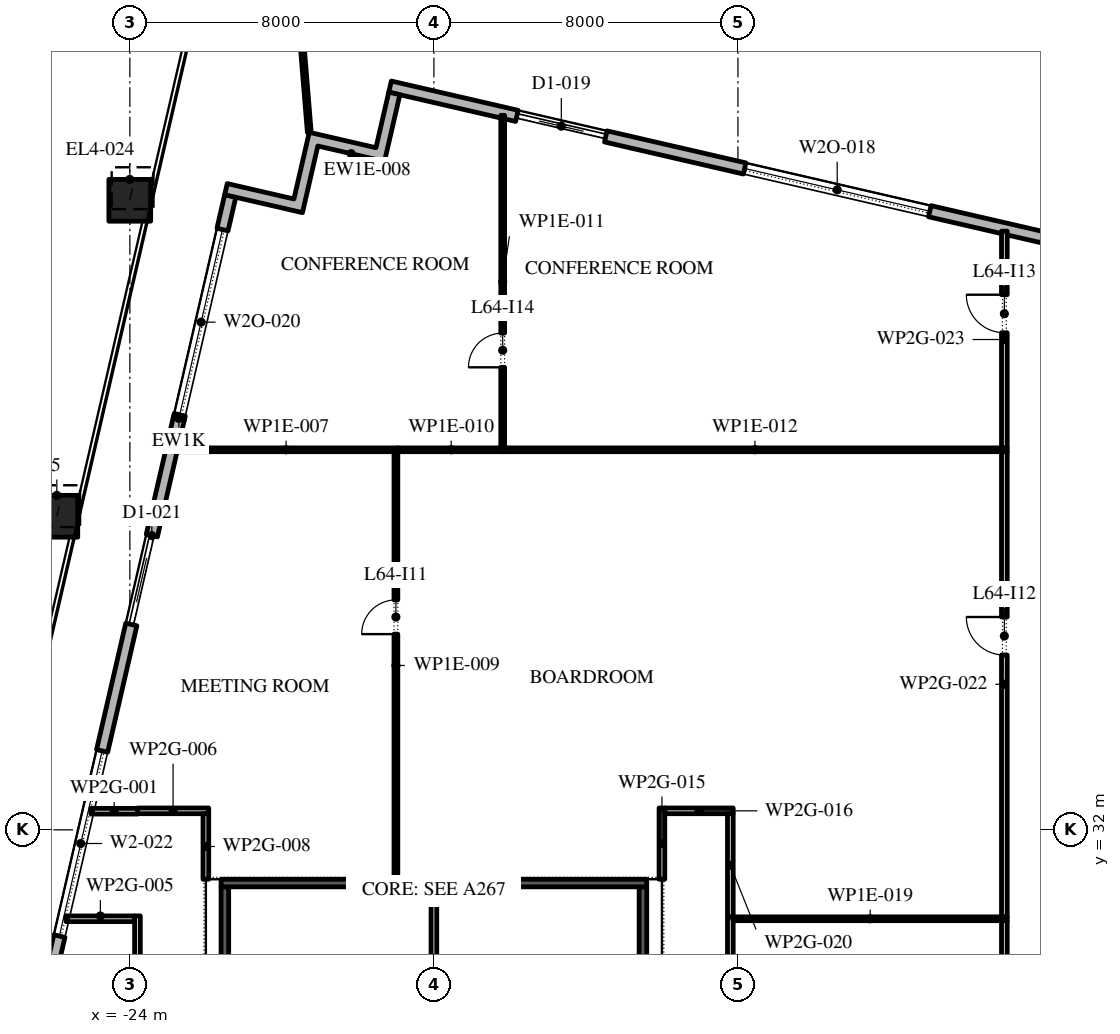
"""IFC4 building model, lengths in metres.
Left out: names, types, materials, properties, quantities, classifications, styles, units other than length and angle.
Written with IfcOpenShell. Run it as: python <this file> out.ifc"""

import sys

from ifc_helpers import new_model, si_unit, direction, frame, frame_2d, origin, origin_2d, place, context, subcontext, project, spatial, polyline, rectangle, outline, extrude, element, fill, save


model = new_model("IFC4")
c1 = context("Model", 3, precision=1e-05, world=origin(), true_north=direction((0.0, 1.0)))
c2 = subcontext(c1, "Body", "Model", "MODEL_VIEW")
j1 = project(units=[si_unit("LENGTHUNIT", "METRE"), si_unit("PLANEANGLEUNIT", "RADIAN")], contexts=[c1])
p1 = place(None, origin())
s1 = spatial("IfcSite", under=j1, at=p1, CompositionType="ELEMENT")
p2 = place(p1, origin())
s2 = spatial("IfcBuilding", under=s1, at=p2, CompositionType="ELEMENT")
p3 = place(p2, frame((0.0, 0.0, 293.4)))
s3 = spatial("IfcBuildingStorey", under=s2, at=p3, CompositionType="ELEMENT", Elevation=293.4)
p4 = place(p3, frame((-24.002, 48.565, 0.0), z_axis=(0.017501014434, 0.075683194872, 0.996978318976), x_axis=(-0.974290512438, 0.225295355862, 0.0)))
e1 = element("IfcColumn", 1, at=p4, inside=s3, PredefinedType="COLUMN", context=c2, shape_type="SweptSolid", body=[
    extrude(rectangle(XDim=1.1, YDim=1.1, at=origin_2d()), origin(), (0.0, 0.0, 1.0), 4.213),
])
p5 = place(p3, frame((-25.921, 40.251, 0.0), z_axis=(0.014558999143, 0.063108330945, 0.997900483069), x_axis=(-0.97440628778, 0.224794097641, 0.0)))
e2 = element("IfcColumn", 2, at=p5, inside=s3, PredefinedType="COLUMN", context=c2, shape_type="SweptSolid", body=[
    extrude(rectangle(XDim=1.1, YDim=1.1, at=origin_2d()), origin(), (0.0, 0.0, 1.0), 4.209),
])
p6 = place(p3, frame((29.616, 40.758, 0.0), z_axis=(0.0, 0.0, 1.0), x_axis=(-0.974370532314, 0.224949029246, 0.0)))
e3 = element("IfcWall", 3, at=p6, inside=s3, PredefinedType="STANDARD", context=c2, shape_type="SweptSolid", body=[
    extrude(rectangle(XDim=48.0, YDim=0.3, at=frame_2d((24.0, 0.0))), origin(), (0.0, 0.0, 1.0), 3.75),
])
p7 = place(p6, frame((1.375, 0.0, 0.45)))
e4 = element("IfcOpeningElement", 4, at=p7, cuts=e3, PredefinedType="OPENING", context=c2, shape_type="SweptSolid", body=[
    extrude(rectangle(XDim=5.0, YDim=2.2, at=frame_2d((2.5, 1.1))), frame((0.0, 0.16, 0.0), z_axis=(0.0, -1.0, 0.0), x_axis=(1.0, 0.0, 0.0)), (0.0, 0.0, 1.0), 0.32),
])
p8 = place(p6, frame((10.575, 0.0, 0.0)))
e5 = element("IfcOpeningElement", 5, at=p8, cuts=e3, PredefinedType="OPENING", context=c2, shape_type="SweptSolid", body=[
    extrude(rectangle(XDim=2.4, YDim=2.65, at=frame_2d((1.2, 1.325))), frame((0.0, 0.16, 0.0), z_axis=(0.0, -1.0, 0.0), x_axis=(1.0, 0.0, 0.0)), (0.0, 0.0, 1.0), 0.32),
])
p9 = place(p6, frame((17.325, 0.0, 0.45)))
e6 = element("IfcOpeningElement", 6, at=p9, cuts=e3, PredefinedType="OPENING", context=c2, shape_type="SweptSolid", body=[
    extrude(rectangle(XDim=5.0, YDim=2.2, at=frame_2d((2.5, 1.1))), frame((0.0, 0.16, 0.0), z_axis=(0.0, -1.0, 0.0), x_axis=(1.0, 0.0, 0.0)), (0.0, 0.0, 1.0), 0.32),
])
p10 = place(p6, frame((25.375, 0.0, 0.45)))
e7 = element("IfcOpeningElement", 7, at=p10, cuts=e3, PredefinedType="OPENING", context=c2, shape_type="SweptSolid", body=[
    extrude(rectangle(XDim=5.0, YDim=2.2, at=frame_2d((2.5, 1.1))), frame((0.0, 0.16, 0.0), z_axis=(0.0, -1.0, 0.0), x_axis=(1.0, 0.0, 0.0)), (0.0, 0.0, 1.0), 0.32),
])
p11 = place(p6, frame((33.425, 0.0, 0.45)))
e8 = element("IfcOpeningElement", 8, at=p11, cuts=e3, PredefinedType="OPENING", context=c2, shape_type="SweptSolid", body=[
    extrude(rectangle(XDim=5.0, YDim=2.2, at=frame_2d((2.5, 1.1))), frame((0.0, 0.16, 0.0), z_axis=(0.0, -1.0, 0.0), x_axis=(1.0, 0.0, 0.0)), (0.0, 0.0, 1.0), 0.32),
])
p12 = place(p6, frame((42.175, 0.0, 0.0)))
e9 = element("IfcOpeningElement", 9, at=p12, cuts=e3, PredefinedType="OPENING", context=c2, shape_type="SweptSolid", body=[
    extrude(rectangle(XDim=2.4, YDim=3.5, at=frame_2d((1.2, 1.75))), frame((0.0, 0.16, 0.0), z_axis=(0.0, -1.0, 0.0), x_axis=(1.0, 0.0, 0.0)), (0.0, 0.0, 1.0), 0.32),
])
p13 = place(p3, frame((-21.359, 48.678, 0.0), z_axis=(0.0, 0.0, 1.0), x_axis=(-0.224957459086, -0.974368586112, 0.0)))
e10 = element("IfcWall", 10, at=p13, inside=s3, PredefinedType="STANDARD", context=c2, shape_type="SweptSolid", body=[
    extrude(rectangle(XDim=6.007, YDim=0.3, at=frame_2d((3.003, 0.0))), origin(), (0.0, 0.0, 1.0), 2.77),
])
p14 = place(p13, frame((0.907, 0.0, 0.45)))
e11 = element("IfcOpeningElement", 11, at=p14, cuts=e10, PredefinedType="OPENING", context=c2, shape_type="SweptSolid", body=[
    extrude(rectangle(XDim=5.0, YDim=2.2, at=frame_2d((2.5, 1.1))), frame((0.0, 0.16, 0.0), z_axis=(0.0, -1.0, 0.0), x_axis=(1.0, 0.0, 0.0)), (0.0, 0.0, 1.0), 0.32),
])
p15 = place(p3, origin())
e12 = element("IfcWall", 12, at=p15, inside=s3, PredefinedType="STANDARD", context=c2, shape_type="SweptSolid", body=[
    extrude(outline(polyline([(-21.505, 48.712), (-21.438, 49.004), (-19.684, 48.599), (-19.279, 50.353), (-17.525, 49.948), (-17.188, 51.41), (-16.895, 51.342), (-17.3, 49.588), (-19.054, 49.993), (-19.459, 48.24), (-21.505, 48.712)])), origin(), (0.0, 0.0, 1.0), 3.75),
])
p16 = place(p3, frame((-19.279, 50.353, -0.05), z_axis=(0.0, 0.0, 1.0), x_axis=(-0.081671409599, 0.996659310323, 0.0)))
e13 = element("IfcWall", 13, at=p16, inside=s3, PredefinedType="STANDARD", context=c2, shape_type="SweptSolid", body=[
    extrude(rectangle(XDim=7.103, YDim=0.1, at=frame_2d((3.551, 0.0))), origin(), (0.0, 0.0, 1.0), 3.8),
])
p17 = place(p3, frame((-21.5, 25.75, 0.0), z_axis=(0.0, 0.0, 1.0), x_axis=(0.0, 1.0, 0.0)))
e14 = element("IfcWall", 14, at=p17, inside=s3, PredefinedType="SHEAR", context=c2, shape_type="SweptSolid", body=[
    extrude(rectangle(XDim=4.75, YDim=0.2, at=frame_2d((2.375, 0.0))), origin(), (0.0, 0.0, 1.0), 3.75),
])
p18 = place(p17, frame((1.925, 0.0, 0.0)))
e15 = element("IfcOpeningElement", 15, at=p18, cuts=e14, PredefinedType="OPENING", context=c2, shape_type="SweptSolid", body=[
    extrude(rectangle(XDim=0.9, YDim=2.1, at=frame_2d((0.45, 1.05))), frame((0.0, 0.11, 0.0), z_axis=(0.0, -1.0, 0.0), x_axis=(1.0, 0.0, 0.0)), (0.0, 0.0, 1.0), 0.22),
])
p19 = place(p3, frame((-10.5, 25.75, 0.0), z_axis=(0.0, 0.0, 1.0), x_axis=(0.0, 1.0, 0.0)))
e16 = element("IfcWall", 16, at=p19, inside=s3, PredefinedType="SHEAR", context=c2, shape_type="SweptSolid", body=[
    extrude(rectangle(XDim=4.75, YDim=0.2, at=frame_2d((2.375, 0.0))), origin(), (0.0, 0.0, 1.0), 3.75),
])
p20 = place(p19, frame((1.925, 0.0, 0.0)))
e17 = element("IfcOpeningElement", 17, at=p20, cuts=e16, PredefinedType="OPENING", context=c2, shape_type="SweptSolid", body=[
    extrude(rectangle(XDim=0.9, YDim=2.1, at=frame_2d((0.45, 1.05))), frame((0.0, 0.11, 0.0), z_axis=(0.0, -1.0, 0.0), x_axis=(1.0, 0.0, 0.0)), (0.0, 0.0, 1.0), 0.22),
])
p21 = place(p3, frame((-21.6, 30.6, 0.0), z_axis=(0.0, 0.0, 1.0), x_axis=(1.0, 0.0, 0.0)))
e18 = element("IfcWall", 18, at=p21, inside=s3, PredefinedType="SHEAR", context=c2, shape_type="SweptSolid", body=[
    extrude(rectangle(XDim=11.2, YDim=0.2, at=frame_2d((5.6, 0.0))), origin(), (0.0, 0.0, 1.0), 3.75),
])
p22 = place(p3, frame((-16.0, 25.75, 0.0), z_axis=(0.0, 0.0, 1.0), x_axis=(0.0, 1.0, 0.0)))
e19 = element("IfcWall", 19, at=p22, inside=s3, PredefinedType="PARTITIONING", context=c2, shape_type="SweptSolid", body=[
    extrude(rectangle(XDim=4.75, YDim=0.15, at=frame_2d((2.375, 0.0))), origin(), (0.0, 0.0, 1.0), 3.75),
])
p23 = place(p3, frame((-25.025, 32.49, 0.0), z_axis=(0.0, 0.0, 1.0), x_axis=(1.0, 0.0, 0.0)))
e20 = element("IfcWall", 20, at=p23, inside=s3, PredefinedType="PARTITIONING", context=c2, shape_type="SweptSolid", body=[
    extrude(rectangle(XDim=1.225, YDim=0.15, at=frame_2d((0.612, 0.0))), origin(), (0.0, 0.0, 1.0), 3.75),
])
p24 = place(p3, frame((-23.8, 7.35, 0.0), z_axis=(0.0, 0.0, 1.0), x_axis=(0.0, 1.0, 0.0)))
e21 = element("IfcWall", 21, at=p24, inside=s3, PredefinedType="PARTITIONING", context=c2, shape_type="SweptSolid", body=[
    extrude(rectangle(XDim=22.385, YDim=0.15, at=frame_2d((11.192, 0.0))), origin(), (0.0, 0.0, 1.0), 3.75),
])
p25 = place(p24, frame((10.66, 0.0, 0.0)))
e22 = element("IfcOpeningElement", 22, at=p25, cuts=e21, PredefinedType="OPENING", context=c2, shape_type="SweptSolid", body=[
    extrude(rectangle(XDim=1.0, YDim=2.1, at=frame_2d((0.5, 1.05))), frame((0.0, 0.085, 0.0), z_axis=(0.0, -1.0, 0.0), x_axis=(1.0, 0.0, 0.0)), (0.0, 0.0, 1.0), 0.17),
])
p26 = place(p3, frame((-23.875, 29.66, 0.0), z_axis=(0.0, 0.0, 1.0), x_axis=(-1.0, 0.0, 0.0)))
e23 = element("IfcWall", 23, at=p26, inside=s3, PredefinedType="PARTITIONING", context=c2, shape_type="SweptSolid", body=[
    extrude(rectangle(XDim=1.803, YDim=0.15, at=frame_2d((0.901, 0.0))), origin(), (0.0, 0.0, 1.0), 3.75),
])
p27 = place(p3, frame((-23.8, 32.5, 0.0), z_axis=(0.0, 0.0, 1.0), x_axis=(1.0, 0.0, 0.0)))
e24 = element("IfcWall", 24, at=p27, inside=s3, PredefinedType="PARTITIONING", context=c2, shape_type="SweptSolid", body=[
    extrude(rectangle(XDim=1.875, YDim=0.15, at=frame_2d((0.938, 0.0))), origin(), (0.0, 0.0, 1.0), 3.75),
])
p28 = place(p3, frame((-22.829, 42.0, 0.0), z_axis=(0.0, 0.0, 1.0), x_axis=(1.0, 0.0, 0.0)))
e25 = element("IfcWall", 25, at=p28, inside=s3, PredefinedType="PARTITIONING", context=c2, shape_type="SweptSolid", body=[
    extrude(rectangle(XDim=5.879, YDim=0.1, at=frame_2d((2.939, 0.0))), origin(), (0.0, 0.0, 1.0), 3.75),
])
p29 = place(p3, frame((-22.0, 32.425, 0.0), z_axis=(0.0, 0.0, 1.0), x_axis=(0.0, -1.0, 0.0)))
e26 = element("IfcWall", 26, at=p29, inside=s3, PredefinedType="PARTITIONING", context=c2, shape_type="SweptSolid", body=[
    extrude(rectangle(XDim=1.725, YDim=0.15, at=frame_2d((0.863, 0.0))), origin(), (0.0, 0.0, 1.0), 3.75),
])
p30 = place(p3, frame((-17.0, 41.95, 0.0), z_axis=(0.0, 0.0, 1.0), x_axis=(0.0, -1.0, 0.0)))
e27 = element("IfcWall", 27, at=p30, inside=s3, PredefinedType="PARTITIONING", context=c2, shape_type="SweptSolid", body=[
    extrude(rectangle(XDim=11.25, YDim=0.1, at=frame_2d((5.625, 0.0))), origin(), (0.0, 0.0, 1.0), 3.75),
])
p31 = place(p30, frame((3.9, 0.0, 0.0)))
e28 = element("IfcOpeningElement", 28, at=p31, cuts=e27, PredefinedType="OPENING", context=c2, shape_type="SweptSolid", body=[
    extrude(rectangle(XDim=0.9, YDim=2.1, at=frame_2d((0.45, 1.05))), frame((0.0, 0.06, 0.0), z_axis=(0.0, -1.0, 0.0), x_axis=(1.0, 0.0, 0.0)), (0.0, 0.0, 1.0), 0.12),
])
p32 = place(p3, frame((-16.95, 42.0, 0.0), z_axis=(0.0, 0.0, 1.0), x_axis=(1.0, 0.0, 0.0)))
e29 = element("IfcWall", 29, at=p32, inside=s3, PredefinedType="PARTITIONING", context=c2, shape_type="SweptSolid", body=[
    extrude(rectangle(XDim=2.81, YDim=0.1, at=frame_2d((1.405, 0.0))), origin(), (0.0, 0.0, 1.0), 3.75),
])
p33 = place(p3, frame((-14.19, 42.05, 0.0), z_axis=(0.0, 0.0, 1.0), x_axis=(0.0, 1.0, 0.0)))
e30 = element("IfcWall", 30, at=p33, inside=s3, PredefinedType="PARTITIONING", context=c2, shape_type="SweptSolid", body=[
    extrude(rectangle(XDim=8.75, YDim=0.1, at=frame_2d((4.375, 0.0))), origin(), (0.0, 0.0, 1.0), 3.75),
])
p34 = place(p33, frame((2.12, 0.0, 0.0)))
e31 = element("IfcOpeningElement", 31, at=p34, cuts=e30, PredefinedType="OPENING", context=c2, shape_type="SweptSolid", body=[
    extrude(rectangle(XDim=0.9, YDim=2.1, at=frame_2d((0.45, 1.05))), frame((0.0, 0.06, 0.0), z_axis=(0.0, -1.0, 0.0), x_axis=(1.0, 0.0, 0.0)), (0.0, 0.0, 1.0), 0.12),
])
p35 = place(p3, frame((-14.19, 42.0, 0.0), z_axis=(0.0, 0.0, 1.0), x_axis=(1.0, 0.0, 0.0)))
e32 = element("IfcWall", 32, at=p35, inside=s3, PredefinedType="PARTITIONING", context=c2, shape_type="SweptSolid", body=[
    extrude(rectangle(XDim=13.275, YDim=0.1, at=frame_2d((6.637, 0.0))), origin(), (0.0, 0.0, 1.0), 3.75),
])
p36 = place(p3, frame((-10.0, 30.7, 0.0), z_axis=(0.0, 0.0, 1.0), x_axis=(0.0, 1.0, 0.0)))
e33 = element("IfcWall", 33, at=p36, inside=s3, PredefinedType="PARTITIONING", context=c2, shape_type="SweptSolid", body=[
    extrude(rectangle(XDim=1.875, YDim=0.15, at=frame_2d((0.938, 0.0))), origin(), (0.0, 0.0, 1.0), 3.75),
])
p37 = place(p3, frame((-9.925, 32.5, 0.0), z_axis=(0.0, 0.0, 1.0), x_axis=(1.0, 0.0, 0.0)))
e34 = element("IfcWall", 34, at=p37, inside=s3, PredefinedType="PARTITIONING", context=c2, shape_type="SweptSolid", body=[
    extrude(rectangle(XDim=1.8, YDim=0.15, at=frame_2d((0.9, 0.0))), origin(), (0.0, 0.0, 1.0), 3.75),
])
p38 = place(p3, frame((-8.2, 29.71, 0.0), z_axis=(0.0, 0.0, 1.0), x_axis=(0.0, -1.0, 0.0)))
e35 = element("IfcWall", 35, at=p38, inside=s3, PredefinedType="PARTITIONING", context=c2, shape_type="SweptSolid", body=[
    extrude(rectangle(XDim=10.635, YDim=0.15, at=frame_2d((5.317, 0.0))), origin(), (0.0, 0.0, 1.0), 3.75),
])
p39 = place(p38, frame((4.81, 0.0, 0.0)))
e36 = element("IfcOpeningElement", 36, at=p39, cuts=e35, PredefinedType="OPENING", context=c2, shape_type="SweptSolid", body=[
    extrude(rectangle(XDim=1.0, YDim=2.1, at=frame_2d((0.5, 1.05))), frame((0.0, 0.085, 0.0), z_axis=(0.0, -1.0, 0.0), x_axis=(1.0, 0.0, 0.0)), (0.0, 0.0, 1.0), 0.17),
])
p40 = place(p3, frame((-8.125, 29.66, 0.0), z_axis=(0.0, 0.0, 1.0), x_axis=(1.0, 0.0, 0.0)))
e37 = element("IfcWall", 37, at=p40, inside=s3, PredefinedType="PARTITIONING", context=c2, shape_type="SweptSolid", body=[
    extrude(rectangle(XDim=7.21, YDim=0.1, at=frame_2d((3.605, 0.0))), origin(), (0.0, 0.0, 1.0), 3.75),
])
p41 = place(p3, frame((-8.2, 32.425, 0.0), z_axis=(0.0, 0.0, 1.0), x_axis=(0.0, -1.0, 0.0)))
e38 = element("IfcWall", 38, at=p41, inside=s3, PredefinedType="PARTITIONING", context=c2, shape_type="SweptSolid", body=[
    extrude(rectangle(XDim=2.715, YDim=0.15, at=frame_2d((1.357, 0.0))), origin(), (0.0, 0.0, 1.0), 3.75),
])
p42 = place(p3, frame((-0.99, 19.075, 0.0), z_axis=(0.0, 0.0, 1.0), x_axis=(0.0, 1.0, 0.0)))
e39 = element("IfcWall", 39, at=p42, inside=s3, PredefinedType="PARTITIONING", context=c2, shape_type="SweptSolid", body=[
    extrude(rectangle(XDim=10.535, YDim=0.15, at=frame_2d((5.268, 0.0))), origin(), (0.0, 0.0, 1.0), 3.75),
])
p43 = place(p3, frame((-0.99, 29.71, 0.0), z_axis=(0.0, 0.0, 1.0), x_axis=(0.0, 1.0, 0.0)))
e40 = element("IfcWall", 40, at=p43, inside=s3, PredefinedType="PARTITIONING", context=c2, shape_type="SweptSolid", body=[
    extrude(rectangle(XDim=12.24, YDim=0.15, at=frame_2d((6.12, 0.0))), origin(), (0.0, 0.0, 1.0), 3.75),
])
p44 = place(p43, frame((6.89, 0.0, 0.0)))
e41 = element("IfcOpeningElement", 41, at=p44, cuts=e40, PredefinedType="OPENING", context=c2, shape_type="SweptSolid", body=[
    extrude(rectangle(XDim=1.0, YDim=2.1, at=frame_2d((0.5, 1.05))), frame((0.0, 0.085, 0.0), z_axis=(0.0, -1.0, 0.0), x_axis=(1.0, 0.0, 0.0)), (0.0, 0.0, 1.0), 0.17),
])
p45 = place(p3, frame((-0.99, 42.05, 0.0), z_axis=(0.0, 0.0, 1.0), x_axis=(0.0, 1.0, 0.0)))
e42 = element("IfcWall", 42, at=p45, inside=s3, PredefinedType="PARTITIONING", context=c2, shape_type="SweptSolid", body=[
    extrude(rectangle(XDim=5.703, YDim=0.15, at=frame_2d((2.852, 0.0))), origin(), (0.0, 0.0, 1.0), 3.75),
])
p46 = place(p45, frame((3.03, 0.0, 0.0)))
e43 = element("IfcOpeningElement", 43, at=p46, cuts=e42, PredefinedType="OPENING", context=c2, shape_type="SweptSolid", body=[
    extrude(rectangle(XDim=1.0, YDim=2.1, at=frame_2d((0.5, 1.05))), frame((0.0, 0.085, 0.0), z_axis=(0.0, -1.0, 0.0), x_axis=(1.0, 0.0, 0.0)), (0.0, 0.0, 1.0), 0.17),
])
p47 = place(p3, frame((-22.71, 42.825, 0.0), z_axis=(0.0, 0.0, 1.0), x_axis=(-0.224948057419, -0.974370756675, 0.0)))
e44 = element("IfcWall", 44, at=p47, inside=s3, PredefinedType="STANDARD", context=c2, shape_type="SweptSolid", body=[
    extrude(rectangle(XDim=43.493, YDim=0.3, at=frame_2d((21.747, 0.0))), origin(), (0.0, 0.0, 1.0), 3.75),
])
p48 = place(p47, frame((3.164, 0.0, 0.0)))
e45 = element("IfcOpeningElement", 45, at=p48, cuts=e44, PredefinedType="OPENING", context=c2, shape_type="SweptSolid", body=[
    extrude(rectangle(XDim=2.4, YDim=3.5, at=frame_2d((1.2, 1.75))), frame((0.0, 0.16, 0.0), z_axis=(0.0, -1.0, 0.0), x_axis=(1.0, 0.0, 0.0)), (0.0, 0.0, 1.0), 0.32),
])
p49 = place(p47, frame((8.979, 0.0, 0.45)))
e46 = element("IfcOpeningElement", 46, at=p49, cuts=e44, PredefinedType="OPENING", context=c2, shape_type="SweptSolid", body=[
    extrude(rectangle(XDim=5.0, YDim=3.25, at=frame_2d((2.5, 1.625))), frame((0.0, 0.16, 0.0), z_axis=(0.0, -1.0, 0.0), x_axis=(1.0, 0.0, 0.0)), (0.0, 0.0, 1.0), 0.32),
])
p50 = place(p47, frame((16.093, 0.0, 0.45)))
e47 = element("IfcOpeningElement", 47, at=p50, cuts=e44, PredefinedType="OPENING", context=c2, shape_type="SweptSolid", body=[
    extrude(rectangle(XDim=5.0, YDim=2.7, at=frame_2d((2.5, 1.35))), frame((0.0, 0.16, 0.0), z_axis=(0.0, -1.0, 0.0), x_axis=(1.0, 0.0, 0.0)), (0.0, 0.0, 1.0), 0.32),
])
p51 = place(p47, frame((23.207, 0.0, 0.45)))
e48 = element("IfcOpeningElement", 48, at=p51, cuts=e44, PredefinedType="OPENING", context=c2, shape_type="SweptSolid", body=[
    extrude(rectangle(XDim=5.0, YDim=3.25, at=frame_2d((2.5, 1.625))), frame((0.0, 0.16, 0.0), z_axis=(0.0, -1.0, 0.0), x_axis=(1.0, 0.0, 0.0)), (0.0, 0.0, 1.0), 0.32),
])
p52 = place(p47, frame((31.621, 0.0, 0.0)))
e49 = element("IfcOpeningElement", 49, at=p52, cuts=e44, PredefinedType="OPENING", context=c2, shape_type="SweptSolid", body=[
    extrude(rectangle(XDim=2.4, YDim=3.075, at=frame_2d((1.2, 1.538))), frame((0.0, 0.16, 0.0), z_axis=(0.0, -1.0, 0.0), x_axis=(1.0, 0.0, 0.0)), (0.0, 0.0, 1.0), 0.32),
])
p53 = place(p47, frame((37.436, 0.0, 0.45)))
e50 = element("IfcOpeningElement", 50, at=p53, cuts=e44, PredefinedType="OPENING", context=c2, shape_type="SweptSolid", body=[
    extrude(rectangle(XDim=5.0, YDim=2.575, at=frame_2d((2.5, 1.288))), frame((0.0, 0.16, 0.0), z_axis=(0.0, -1.0, 0.0), x_axis=(1.0, 0.0, 0.0)), (0.0, 0.0, 1.0), 0.32),
])
p54 = place(p11, origin())
e51 = element("IfcWindow", 51, at=p54, inside=s3, PartitioningType="DOUBLE_PANEL_VERTICAL", PredefinedType="WINDOW", context=c2, shape_type="SweptSolid", body=[
    extrude(rectangle(XDim=5.0, YDim=2.2, at=frame_2d((2.5, 1.1))), frame((0.0, 0.03, 0.0), z_axis=(0.0, -1.0, 0.0), x_axis=(1.0, 0.0, 0.0)), (0.0, 0.0, 1.0), 0.06),
])
fill(e8, e51)
p55 = place(p12, origin())
e52 = element("IfcDoor", 52, at=p55, inside=s3, OperationType="DOUBLE_DOOR_SLIDING", PredefinedType="DOOR", context=c2, shape_type="SweptSolid", body=[
    extrude(rectangle(XDim=2.4, YDim=3.5, at=frame_2d((1.2, 1.75))), frame((0.0, 0.025, 0.0), z_axis=(0.0, -1.0, 0.0), x_axis=(1.0, 0.0, 0.0)), (0.0, 0.0, 1.0), 0.05),
])
fill(e9, e52)
p56 = place(p14, origin())
e53 = element("IfcWindow", 53, at=p56, inside=s3, PartitioningType="DOUBLE_PANEL_VERTICAL", PredefinedType="WINDOW", context=c2, shape_type="SweptSolid", body=[
    extrude(rectangle(XDim=5.0, YDim=2.2, at=frame_2d((2.5, 1.1))), frame((0.0, 0.03, 0.0), z_axis=(0.0, -1.0, 0.0), x_axis=(1.0, 0.0, 0.0)), (0.0, 0.0, 1.0), 0.06),
])
fill(e11, e53)
p57 = place(p48, origin())
e54 = element("IfcDoor", 54, at=p57, inside=s3, OperationType="DOUBLE_DOOR_SLIDING", PredefinedType="DOOR", context=c2, shape_type="SweptSolid", body=[
    extrude(rectangle(XDim=2.4, YDim=3.5, at=frame_2d((1.2, 1.75))), frame((0.0, 0.025, 0.0), z_axis=(0.0, -1.0, 0.0), x_axis=(1.0, 0.0, 0.0)), (0.0, 0.0, 1.0), 0.05),
])
fill(e45, e54)
p58 = place(p49, origin())
e55 = element("IfcWindow", 55, at=p58, inside=s3, PartitioningType="DOUBLE_PANEL_VERTICAL", PredefinedType="WINDOW", context=c2, shape_type="SweptSolid", body=[
    extrude(rectangle(XDim=5.0, YDim=3.25, at=frame_2d((2.5, 1.625))), frame((0.0, 0.03, 0.0), z_axis=(0.0, -1.0, 0.0), x_axis=(1.0, 0.0, 0.0)), (0.0, 0.0, 1.0), 0.06),
])
fill(e46, e55)
p59 = place(p31, frame((0.9, 0.0, 0.0), z_axis=(0.0, 0.0, 1.0), x_axis=(-1.0, 0.0, 0.0)))
e56 = element("IfcDoor", 56, at=p59, inside=s3, OperationType="SINGLE_SWING_RIGHT", PredefinedType="DOOR", context=c2, shape_type="SweptSolid", body=[
    extrude(rectangle(XDim=0.9, YDim=2.1, at=frame_2d((0.45, 1.05))), frame((0.0, 0.025, 0.0), z_axis=(0.0, -1.0, 0.0), x_axis=(1.0, 0.0, 0.0)), (0.0, 0.0, 1.0), 0.05),
])
fill(e28, e56)
p60 = place(p44, origin())
e57 = element("IfcDoor", 57, at=p60, inside=s3, OperationType="SINGLE_SWING_LEFT", PredefinedType="DOOR", context=c2, shape_type="SweptSolid", body=[
    extrude(rectangle(XDim=1.0, YDim=2.1, at=frame_2d((0.5, 1.05))), frame((0.0, 0.025, 0.0), z_axis=(0.0, -1.0, 0.0), x_axis=(1.0, 0.0, 0.0)), (0.0, 0.0, 1.0), 0.05),
])
fill(e41, e57)
p61 = place(p46, origin())
e58 = element("IfcDoor", 58, at=p61, inside=s3, OperationType="SINGLE_SWING_LEFT", PredefinedType="DOOR", context=c2, shape_type="SweptSolid", body=[
    extrude(rectangle(XDim=1.0, YDim=2.1, at=frame_2d((0.5, 1.05))), frame((0.0, 0.025, 0.0), z_axis=(0.0, -1.0, 0.0), x_axis=(1.0, 0.0, 0.0)), (0.0, 0.0, 1.0), 0.05),
])
fill(e43, e58)
p62 = place(p34, origin())
e59 = element("IfcDoor", 59, at=p62, inside=s3, OperationType="SINGLE_SWING_RIGHT", PredefinedType="DOOR", context=c2, shape_type="SweptSolid", body=[
    extrude(rectangle(XDim=0.9, YDim=2.1, at=frame_2d((0.45, 1.05))), frame((0.0, 0.025, 0.0), z_axis=(0.0, -1.0, 0.0), x_axis=(1.0, 0.0, 0.0)), (0.0, 0.0, 1.0), 0.05),
])
fill(e31, e59)
save(model, sys.argv[1])
